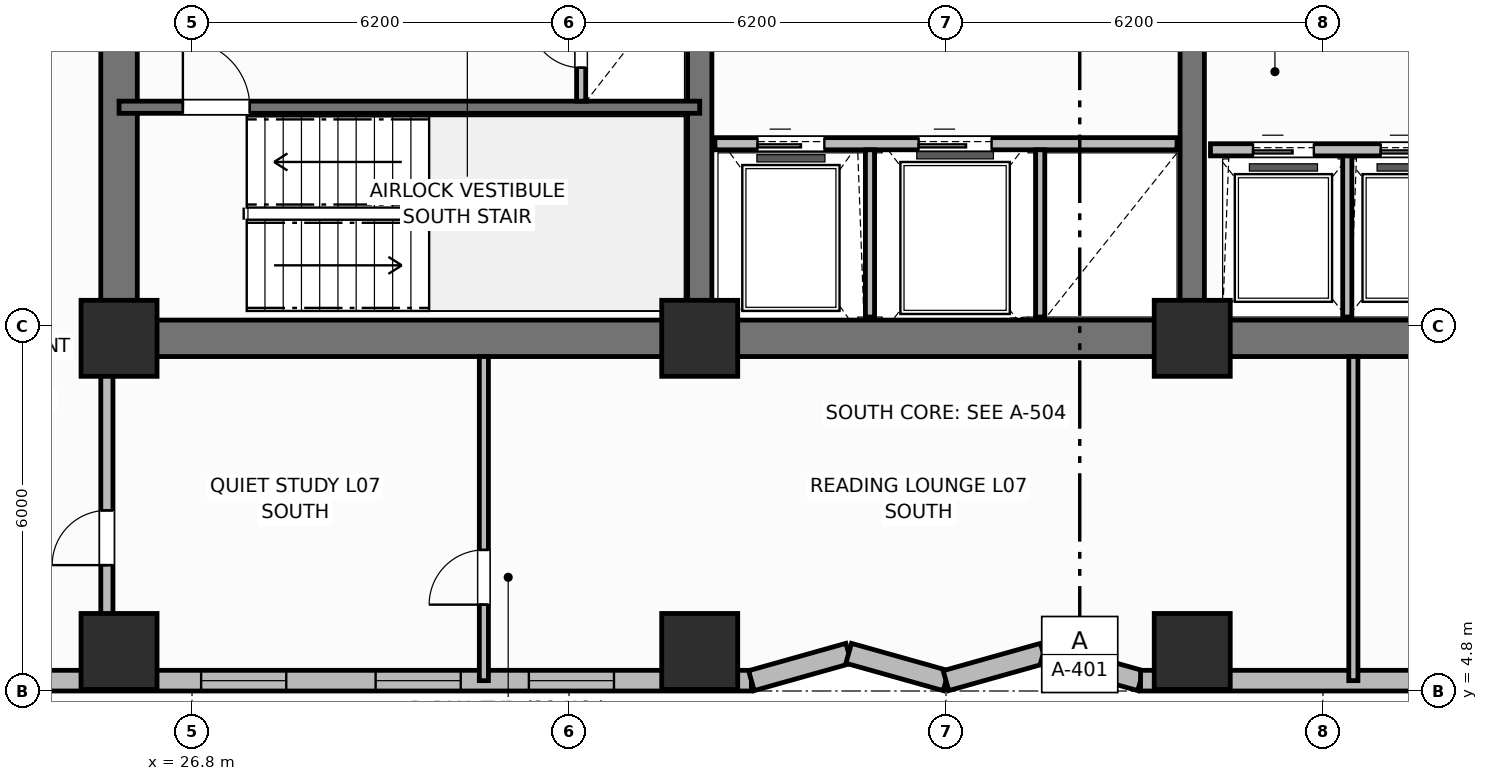
"""IFC4 building model, lengths in metres.
Left out: names, types, materials, properties, quantities, classifications, styles, units other than length and angle.
Written with IfcOpenShell. Run it as: python <this file> out.ifc"""

import sys

from ifc_helpers import new_model, si_unit, direction, frame, frame_2d, origin, origin_2d, place, context, subcontext, project, spatial, rectangle, extrude, element, fill, save


model = new_model("IFC4")
c1 = context("Model", 3, precision=1e-05, world=origin(), true_north=direction((0.0, 1.0)))
c2 = subcontext(c1, "Body", "Model", "MODEL_VIEW")
j1 = project(units=[si_unit("LENGTHUNIT", "METRE"), si_unit("PLANEANGLEUNIT", "RADIAN")], contexts=[c1])
p1 = place(None, origin())
s1 = spatial("IfcSite", under=j1, at=p1, CompositionType="ELEMENT")
p2 = place(p1, origin())
s2 = spatial("IfcBuilding", under=s1, at=p2, CompositionType="ELEMENT")
p3 = place(p2, frame((0.0, 0.0, 32.5)))
s3 = spatial("IfcBuildingStorey", under=s2, at=p3, CompositionType="ELEMENT", Elevation=32.5)
p4 = place(p3, frame((52.8, 10.6, 0.0), z_axis=(0.0, 0.0, 1.0), x_axis=(-1.0, 0.0, 0.0)))
e1 = element("IfcWall", 1, at=p4, inside=s3, PredefinedType="SHEAR", context=c2, shape_type="SweptSolid", body=[
    extrude(rectangle(XDim=27.2, YDim=0.6, at=frame_2d((13.6, 0.0))), origin(), (0.0, 0.0, 1.0), 3.7),
])
p5 = place(p3, frame((25.6, 10.9, 0.0), z_axis=(0.0, 0.0, 1.0), x_axis=(0.0, 1.0, 0.0)))
e2 = element("IfcWall", 2, at=p5, inside=s3, PredefinedType="SHEAR", context=c2, shape_type="SweptSolid", body=[
    extrude(rectangle(XDim=5.6, YDim=0.6, at=frame_2d((2.8, 0.0))), origin(), (0.0, 0.0, 1.0), 3.7),
])
for number, where, z_axis, x_axis in (
    (3, (35.15, 10.9, 0.0), (0.0, 0.0, 1.0), (0.0, 1.0, 0.0)),
    (4, (43.25, 10.9, 0.0), (0.0, 0.0, 1.0), (0.0, 1.0, 0.0)),
):
    element("IfcWall", number, at=place(p3, frame(where, z_axis=z_axis, x_axis=x_axis)), inside=s3, PredefinedType="SHEAR", context=c2, shape_type="SweptSolid", body=[
        extrude(rectangle(XDim=5.6, YDim=0.4, at=frame_2d((2.8, 0.0))), origin(), (0.0, 0.0, 1.0), 3.7),
    ])
for number, where, z_axis, x_axis in (
    (5, (25.6, 10.6, 0.0), (0.0, 0.0, 1.0), (1.0, 0.0, 0.0)),
    (6, (35.15, 10.6, 0.0), (0.0, 0.0, 1.0), (1.0, 0.0, 0.0)),
    (7, (43.25, 10.6, 0.0), (0.0, 0.0, 1.0), (1.0, 0.0, 0.0)),
    (8, (25.6, 5.45, 0.0), (0.0, 0.0, 1.0), (1.0, 0.0, 0.0)),
    (9, (35.15, 5.45, 0.0), (0.0, 0.0, 1.0), (1.0, 0.0, 0.0)),
    (10, (43.25, 5.45, 0.0), (0.0, 0.0, 1.0), (1.0, 0.0, 0.0)),
):
    element("IfcColumn", number, at=place(p3, frame(where, z_axis=z_axis, x_axis=x_axis)), inside=s3, PredefinedType="COLUMN", context=c2, shape_type="SweptSolid", body=[
        extrude(rectangle(XDim=1.25, YDim=1.25, at=origin_2d()), origin(), (0.0, 0.0, 1.0), 3.7),
    ])
p6 = place(p3, frame((18.6, 4.97, 0.0), z_axis=(0.0, 0.0, 1.0), x_axis=(1.0, 0.0, 0.0)))
e11 = element("IfcWall", 11, at=p6, inside=s3, PredefinedType="SOLIDWALL", context=c2, shape_type="SweptSolid", body=[
    extrude(rectangle(XDim=17.4, YDim=0.34, at=frame_2d((8.7, 0.0))), origin(), (0.0, 0.0, 1.0), 2.7),
])
p7 = place(p6, frame((1.56, 0.0, 0.73)))
e12 = element("IfcOpeningElement", 12, at=p7, cuts=e11, PredefinedType="OPENING", context=c2, shape_type="SweptSolid", body=[
    extrude(rectangle(XDim=1.4, YDim=1.85, at=frame_2d((0.7, 0.925))), frame((0.0, 0.18, 0.0), z_axis=(0.0, -1.0, 0.0), x_axis=(1.0, 0.0, 0.0)), (0.0, 0.0, 1.0), 0.36),
])
p8 = place(p6, frame((8.35, 0.0, 0.73)))
e13 = element("IfcOpeningElement", 13, at=p8, cuts=e11, PredefinedType="OPENING", context=c2, shape_type="SweptSolid", body=[
    extrude(rectangle(XDim=1.4, YDim=1.85, at=frame_2d((0.7, 0.925))), frame((0.0, 0.18, 0.0), z_axis=(0.0, -1.0, 0.0), x_axis=(1.0, 0.0, 0.0)), (0.0, 0.0, 1.0), 0.36),
])
p9 = place(p6, frame((11.22, 0.0, 0.73)))
e14 = element("IfcOpeningElement", 14, at=p9, cuts=e11, PredefinedType="OPENING", context=c2, shape_type="SweptSolid", body=[
    extrude(rectangle(XDim=1.4, YDim=1.85, at=frame_2d((0.7, 0.925))), frame((0.0, 0.18, 0.0), z_axis=(0.0, -1.0, 0.0), x_axis=(1.0, 0.0, 0.0)), (0.0, 0.0, 1.0), 0.36),
])
p10 = place(p6, frame((13.74, 0.0, 0.73)))
e15 = element("IfcOpeningElement", 15, at=p10, cuts=e11, PredefinedType="OPENING", context=c2, shape_type="SweptSolid", body=[
    extrude(rectangle(XDim=1.4, YDim=1.85, at=frame_2d((0.7, 0.925))), frame((0.0, 0.18, 0.0), z_axis=(0.0, -1.0, 0.0), x_axis=(1.0, 0.0, 0.0)), (0.0, 0.0, 1.0), 0.36),
])
p11 = place(p3, frame((36.0, 4.97, 0.0), z_axis=(0.0, 0.0, 1.0), x_axis=(0.962662902433, 0.270703040766, 0.0)))
e16 = element("IfcWall", 16, at=p11, inside=s3, PredefinedType="SOLIDWALL", context=c2, shape_type="SweptSolid", body=[
    extrude(rectangle(XDim=1.662, YDim=0.34, at=frame_2d((0.831, 0.0))), origin(), (0.0, 0.0, 1.0), 2.7),
])
p12 = place(p3, frame((37.6, 5.42, 0.0), z_axis=(0.0, 0.0, 1.0), x_axis=(0.962652136636, -0.270741322725, 0.0)))
e17 = element("IfcWall", 17, at=p12, inside=s3, PredefinedType="SOLIDWALL", context=c2, shape_type="SweptSolid", body=[
    extrude(rectangle(XDim=1.662, YDim=0.34, at=frame_2d((0.831, 0.0))), origin(), (0.0, 0.0, 1.0), 2.7),
])
p13 = place(p3, frame((39.2, 4.97, 0.0), z_axis=(0.0, 0.0, 1.0), x_axis=(0.962662902433, 0.270703040766, 0.0)))
e18 = element("IfcWall", 18, at=p13, inside=s3, PredefinedType="SOLIDWALL", context=c2, shape_type="SweptSolid", body=[
    extrude(rectangle(XDim=1.662, YDim=0.34, at=frame_2d((0.831, 0.0))), origin(), (0.0, 0.0, 1.0), 2.7),
])
p14 = place(p3, frame((40.8, 5.42, 0.0), z_axis=(0.0, 0.0, 1.0), x_axis=(0.962652136636, -0.270741322725, 0.0)))
e19 = element("IfcWall", 19, at=p14, inside=s3, PredefinedType="SOLIDWALL", context=c2, shape_type="SweptSolid", body=[
    extrude(rectangle(XDim=1.662, YDim=0.34, at=frame_2d((0.831, 0.0))), origin(), (0.0, 0.0, 1.0), 2.7),
])
p15 = place(p3, frame((42.4, 4.97, 0.0), z_axis=(0.0, 0.0, 1.0), x_axis=(1.0, 0.0, 0.0)))
e20 = element("IfcWall", 20, at=p15, inside=s3, PredefinedType="SOLIDWALL", context=c2, shape_type="SweptSolid", body=[
    extrude(rectangle(XDim=17.4, YDim=0.34, at=frame_2d((8.7, 0.0))), origin(), (0.0, 0.0, 1.0), 2.7),
])
p16 = place(p15, frame((4.78, 0.0, 0.73)))
e21 = element("IfcOpeningElement", 21, at=p16, cuts=e20, PredefinedType="OPENING", context=c2, shape_type="SweptSolid", body=[
    extrude(rectangle(XDim=1.4, YDim=1.85, at=frame_2d((0.7, 0.925))), frame((0.0, 0.18, 0.0), z_axis=(0.0, -1.0, 0.0), x_axis=(1.0, 0.0, 0.0)), (0.0, 0.0, 1.0), 0.36),
])
p17 = place(p15, frame((7.65, 0.0, 0.73)))
e22 = element("IfcOpeningElement", 22, at=p17, cuts=e20, PredefinedType="OPENING", context=c2, shape_type="SweptSolid", body=[
    extrude(rectangle(XDim=1.4, YDim=1.85, at=frame_2d((0.7, 0.925))), frame((0.0, 0.18, 0.0), z_axis=(0.0, -1.0, 0.0), x_axis=(1.0, 0.0, 0.0)), (0.0, 0.0, 1.0), 0.36),
])
p18 = place(p15, frame((14.44, 0.0, 0.73)))
e23 = element("IfcOpeningElement", 23, at=p18, cuts=e20, PredefinedType="OPENING", context=c2, shape_type="SweptSolid", body=[
    extrude(rectangle(XDim=1.4, YDim=1.85, at=frame_2d((0.7, 0.925))), frame((0.0, 0.18, 0.0), z_axis=(0.0, -1.0, 0.0), x_axis=(1.0, 0.0, 0.0)), (0.0, 0.0, 1.0), 0.36),
])
p19 = place(p3, frame((25.6, 14.4, 0.0), z_axis=(0.0, 0.0, 1.0), x_axis=(1.0, 0.0, 0.0)))
e24 = element("IfcWall", 24, at=p19, inside=s3, PredefinedType="SHEAR", context=c2, shape_type="SweptSolid", body=[
    extrude(rectangle(XDim=9.55, YDim=0.2, at=frame_2d((4.775, 0.0))), origin(), (0.0, 0.0, 1.0), 3.7),
])
p20 = place(p19, frame((1.05, 0.0, 0.0)))
e25 = element("IfcOpeningElement", 25, at=p20, cuts=e24, PredefinedType="OPENING", context=c2, shape_type="SweptSolid", body=[
    extrude(rectangle(XDim=1.1, YDim=2.15, at=frame_2d((0.55, 1.075))), frame((0.0, 0.11, 0.0), z_axis=(0.0, -1.0, 0.0), x_axis=(1.0, 0.0, 0.0)), (0.0, 0.0, 1.0), 0.22),
])
p21 = place(p3, frame((33.2, 14.5, 0.0), z_axis=(0.0, 0.0, 1.0), x_axis=(0.0, 1.0, 0.0)))
e26 = element("IfcWall", 26, at=p21, inside=s3, PredefinedType="PARTITIONING", context=c2, shape_type="SweptSolid", body=[
    extrude(rectangle(XDim=2.08, YDim=0.15, at=frame_2d((1.04, 0.0))), origin(), (0.0, 0.0, 1.0), 2.53),
])
p22 = place(p21, frame((0.55, 0.0, 0.0)))
e27 = element("IfcOpeningElement", 27, at=p22, cuts=e26, PredefinedType="OPENING", context=c2, shape_type="SweptSolid", body=[
    extrude(rectangle(XDim=0.85, YDim=2.05, at=frame_2d((0.425, 1.025))), frame((0.0, 0.085, 0.0), z_axis=(0.0, -1.0, 0.0), x_axis=(1.0, 0.0, 0.0)), (0.0, 0.0, 1.0), 0.17),
])
p23 = place(p3, frame((35.4, 13.8, 0.0), z_axis=(0.0, 0.0, 1.0), x_axis=(1.0, 0.0, 0.0)))
e28 = element("IfcWall", 28, at=p23, inside=s3, PredefinedType="PARTITIONING", context=c2, shape_type="SweptSolid", body=[
    extrude(rectangle(XDim=7.6, YDim=0.2, at=frame_2d((3.8, 0.0))), origin(), (0.0, 0.0, 1.0), 2.3),
])
p24 = place(p23, frame((0.7, 0.0, 0.0)))
e29 = element("IfcOpeningElement", 29, at=p24, cuts=e28, PredefinedType="OPENING", context=c2, shape_type="SweptSolid", body=[
    extrude(rectangle(XDim=1.1, YDim=2.15, at=frame_2d((0.55, 1.075))), frame((0.0, 0.11, 0.0), z_axis=(0.0, -1.0, 0.0), x_axis=(1.0, 0.0, 0.0)), (0.0, 0.0, 1.0), 0.22),
])
p25 = place(p23, frame((3.35, 0.0, 0.0)))
e30 = element("IfcOpeningElement", 30, at=p25, cuts=e28, PredefinedType="OPENING", context=c2, shape_type="SweptSolid", body=[
    extrude(rectangle(XDim=1.2, YDim=2.15, at=frame_2d((0.6, 1.075))), frame((0.0, 0.11, 0.0), z_axis=(0.0, -1.0, 0.0), x_axis=(1.0, 0.0, 0.0)), (0.0, 0.0, 1.0), 0.22),
])
for number, where, z_axis, x_axis in (
    (31, (37.95, 10.95, 0.0), (0.0, 0.0, 1.0), (0.0, 1.0, 0.0)),
    (32, (40.75, 10.95, 0.0), (0.0, 0.0, 1.0), (0.0, 1.0, 0.0)),
):
    element("IfcWall", number, at=place(p3, frame(where, z_axis=z_axis, x_axis=x_axis)), inside=s3, PredefinedType="PARTITIONING", context=c2, shape_type="SweptSolid", body=[
        extrude(rectangle(XDim=2.75, YDim=0.15, at=frame_2d((1.375, 0.0))), origin(), (0.0, 0.0, 1.0), 2.53),
    ])
p26 = place(p3, frame((45.8, 10.95, 0.0), z_axis=(0.0, 0.0, 1.0), x_axis=(0.0, 1.0, 0.0)))
e33 = element("IfcWall", 33, at=p26, inside=s3, PredefinedType="PARTITIONING", context=c2, shape_type="SweptSolid", body=[
    extrude(rectangle(XDim=2.7, YDim=0.15, at=frame_2d((1.35, 0.0))), origin(), (0.0, 0.0, 1.0), 2.53),
])
p27 = place(p3, frame((43.55, 13.7, 0.0), z_axis=(0.0, 0.0, 1.0), x_axis=(1.0, 0.0, 0.0)))
e34 = element("IfcWall", 34, at=p27, inside=s3, PredefinedType="PARTITIONING", context=c2, shape_type="SweptSolid", body=[
    extrude(rectangle(XDim=6.4, YDim=0.2, at=frame_2d((3.2, 0.0))), origin(), (0.0, 0.0, 1.0), 2.53),
])
p28 = place(p27, frame((0.7, 0.0, 0.0)))
e35 = element("IfcOpeningElement", 35, at=p28, cuts=e34, PredefinedType="OPENING", context=c2, shape_type="SweptSolid", body=[
    extrude(rectangle(XDim=1.0, YDim=2.15, at=frame_2d((0.5, 1.075))), frame((0.0, 0.11, 0.0), z_axis=(0.0, -1.0, 0.0), x_axis=(1.0, 0.0, 0.0)), (0.0, 0.0, 1.0), 0.22),
])
p29 = place(p27, frame((2.8, 0.0, 0.0)))
e36 = element("IfcOpeningElement", 36, at=p29, cuts=e34, PredefinedType="OPENING", context=c2, shape_type="SweptSolid", body=[
    extrude(rectangle(XDim=1.0, YDim=2.15, at=frame_2d((0.5, 1.075))), frame((0.0, 0.11, 0.0), z_axis=(0.0, -1.0, 0.0), x_axis=(1.0, 0.0, 0.0)), (0.0, 0.0, 1.0), 0.22),
])
p30 = place(p27, frame((4.9, 0.0, 0.0)))
e37 = element("IfcOpeningElement", 37, at=p30, cuts=e34, PredefinedType="OPENING", context=c2, shape_type="SweptSolid", body=[
    extrude(rectangle(XDim=1.0, YDim=2.15, at=frame_2d((0.5, 1.075))), frame((0.0, 0.11, 0.0), z_axis=(0.0, -1.0, 0.0), x_axis=(1.0, 0.0, 0.0)), (0.0, 0.0, 1.0), 0.22),
])
p31 = place(p3, frame((31.6, 4.97, 0.0), z_axis=(0.0, 0.0, 1.0), x_axis=(0.0, 1.0, 0.0)))
e38 = element("IfcWall", 38, at=p31, inside=s3, PredefinedType="PARTITIONING", context=c2, shape_type="SweptSolid", body=[
    extrude(rectangle(XDim=5.33, YDim=0.15, at=frame_2d((2.665, 0.0))), origin(), (0.0, 0.0, 1.0), 2.53),
])
p32 = place(p31, frame((1.25, 0.0, 0.0)))
e39 = element("IfcOpeningElement", 39, at=p32, cuts=e38, PredefinedType="OPENING", context=c2, shape_type="SweptSolid", body=[
    extrude(rectangle(XDim=0.9, YDim=2.1, at=frame_2d((0.45, 1.05))), frame((0.0, 0.085, 0.0), z_axis=(0.0, -1.0, 0.0), x_axis=(1.0, 0.0, 0.0)), (0.0, 0.0, 1.0), 0.17),
])
p33 = place(p3, frame((45.9, 4.97, 0.0), z_axis=(0.0, 0.0, 1.0), x_axis=(0.0, 1.0, 0.0)))
e40 = element("IfcWall", 40, at=p33, inside=s3, PredefinedType="PARTITIONING", context=c2, shape_type="SweptSolid", body=[
    extrude(rectangle(XDim=5.33, YDim=0.15, at=frame_2d((2.665, 0.0))), origin(), (0.0, 0.0, 1.0), 2.53),
])
p34 = place(p3, frame((25.4, 5.57, 0.0), z_axis=(0.0, 0.0, 1.0), x_axis=(0.0, 1.0, 0.0)))
e41 = element("IfcWall", 41, at=p34, inside=s3, PredefinedType="PARTITIONING", context=c2, shape_type="SweptSolid", body=[
    extrude(rectangle(XDim=4.73, YDim=0.2, at=frame_2d((2.365, 0.0))), origin(), (0.0, 0.0, 1.0), 2.53),
])
p35 = place(p34, frame((1.3, 0.0, 0.0)))
e42 = element("IfcOpeningElement", 42, at=p35, cuts=e41, PredefinedType="OPENING", context=c2, shape_type="SweptSolid", body=[
    extrude(rectangle(XDim=0.9, YDim=2.1, at=frame_2d((0.45, 1.05))), frame((0.0, 0.11, 0.0), z_axis=(0.0, -1.0, 0.0), x_axis=(1.0, 0.0, 0.0)), (0.0, 0.0, 1.0), 0.22),
])
p36 = place(p8, origin())
e43 = element("IfcWindow", 43, at=p36, inside=s3, PartitioningType="SINGLE_PANEL", PredefinedType="WINDOW", context=c2, shape_type="SweptSolid", body=[
    extrude(rectangle(XDim=1.4, YDim=1.85, at=frame_2d((0.7, 0.925))), frame((0.0, 0.03, 0.0), z_axis=(0.0, -1.0, 0.0), x_axis=(1.0, 0.0, 0.0)), (0.0, 0.0, 1.0), 0.06),
])
fill(e13, e43)
p37 = place(p9, origin())
e44 = element("IfcWindow", 44, at=p37, inside=s3, PartitioningType="SINGLE_PANEL", PredefinedType="WINDOW", context=c2, shape_type="SweptSolid", body=[
    extrude(rectangle(XDim=1.4, YDim=1.85, at=frame_2d((0.7, 0.925))), frame((0.0, 0.03, 0.0), z_axis=(0.0, -1.0, 0.0), x_axis=(1.0, 0.0, 0.0)), (0.0, 0.0, 1.0), 0.06),
])
fill(e14, e44)
p38 = place(p10, origin())
e45 = element("IfcWindow", 45, at=p38, inside=s3, PartitioningType="SINGLE_PANEL", PredefinedType="WINDOW", context=c2, shape_type="SweptSolid", body=[
    extrude(rectangle(XDim=1.4, YDim=1.85, at=frame_2d((0.7, 0.925))), frame((0.0, 0.03, 0.0), z_axis=(0.0, -1.0, 0.0), x_axis=(1.0, 0.0, 0.0)), (0.0, 0.0, 1.0), 0.06),
])
fill(e15, e45)
p39 = place(p20, origin())
e46 = element("IfcDoor", 46, at=p39, inside=s3, OperationType="SINGLE_SWING_LEFT", PredefinedType="DOOR", context=c2, shape_type="SweptSolid", body=[
    extrude(rectangle(XDim=1.1, YDim=2.15, at=frame_2d((0.55, 1.075))), frame((0.0, 0.025, 0.0), z_axis=(0.0, -1.0, 0.0), x_axis=(1.0, 0.0, 0.0)), (0.0, 0.0, 1.0), 0.05),
])
fill(e25, e46)
p40 = place(p22, origin())
e47 = element("IfcDoor", 47, at=p40, inside=s3, OperationType="SINGLE_SWING_RIGHT", PredefinedType="TRAPDOOR", context=c2, shape_type="SweptSolid", body=[
    extrude(rectangle(XDim=0.85, YDim=2.05, at=frame_2d((0.425, 1.025))), frame((0.0, 0.025, 0.0), z_axis=(0.0, -1.0, 0.0), x_axis=(1.0, 0.0, 0.0)), (0.0, 0.0, 1.0), 0.05),
])
fill(e27, e47)
p41 = place(p24, origin())
e48 = element("IfcDoor", 48, at=p41, inside=s3, OperationType="SLIDING_TO_LEFT", PredefinedType="DOOR", context=c2, shape_type="SweptSolid", body=[
    extrude(rectangle(XDim=1.1, YDim=2.15, at=frame_2d((0.55, 1.075))), frame((0.0, 0.025, 0.0), z_axis=(0.0, -1.0, 0.0), x_axis=(1.0, 0.0, 0.0)), (0.0, 0.0, 1.0), 0.05),
])
fill(e29, e48)
p42 = place(p25, origin())
e49 = element("IfcDoor", 49, at=p42, inside=s3, OperationType="SLIDING_TO_LEFT", PredefinedType="DOOR", context=c2, shape_type="SweptSolid", body=[
    extrude(rectangle(XDim=1.2, YDim=2.15, at=frame_2d((0.6, 1.075))), frame((0.0, 0.025, 0.0), z_axis=(0.0, -1.0, 0.0), x_axis=(1.0, 0.0, 0.0)), (0.0, 0.0, 1.0), 0.05),
])
fill(e30, e49)
p43 = place(p28, origin())
e50 = element("IfcDoor", 50, at=p43, inside=s3, OperationType="SLIDING_TO_LEFT", PredefinedType="DOOR", context=c2, shape_type="SweptSolid", body=[
    extrude(rectangle(XDim=1.0, YDim=2.15, at=frame_2d((0.5, 1.075))), frame((0.0, 0.025, 0.0), z_axis=(0.0, -1.0, 0.0), x_axis=(1.0, 0.0, 0.0)), (0.0, 0.0, 1.0), 0.05),
])
fill(e35, e50)
p44 = place(p29, origin())
e51 = element("IfcDoor", 51, at=p44, inside=s3, OperationType="SLIDING_TO_LEFT", PredefinedType="DOOR", context=c2, shape_type="SweptSolid", body=[
    extrude(rectangle(XDim=1.0, YDim=2.15, at=frame_2d((0.5, 1.075))), frame((0.0, 0.025, 0.0), z_axis=(0.0, -1.0, 0.0), x_axis=(1.0, 0.0, 0.0)), (0.0, 0.0, 1.0), 0.05),
])
fill(e36, e51)
p45 = place(p32, origin())
e52 = element("IfcDoor", 52, at=p45, inside=s3, OperationType="SINGLE_SWING_LEFT", PredefinedType="DOOR", context=c2, shape_type="SweptSolid", body=[
    extrude(rectangle(XDim=0.9, YDim=2.1, at=frame_2d((0.45, 1.05))), frame((0.0, 0.025, 0.0), z_axis=(0.0, -1.0, 0.0), x_axis=(1.0, 0.0, 0.0)), (0.0, 0.0, 1.0), 0.05),
])
fill(e39, e52)
p46 = place(p35, origin())
e53 = element("IfcDoor", 53, at=p46, inside=s3, OperationType="SINGLE_SWING_LEFT", PredefinedType="DOOR", context=c2, shape_type="SweptSolid", body=[
    extrude(rectangle(XDim=0.9, YDim=2.1, at=frame_2d((0.45, 1.05))), frame((0.0, 0.025, 0.0), z_axis=(0.0, -1.0, 0.0), x_axis=(1.0, 0.0, 0.0)), (0.0, 0.0, 1.0), 0.05),
])
fill(e42, e53)
save(model, sys.argv[1])
